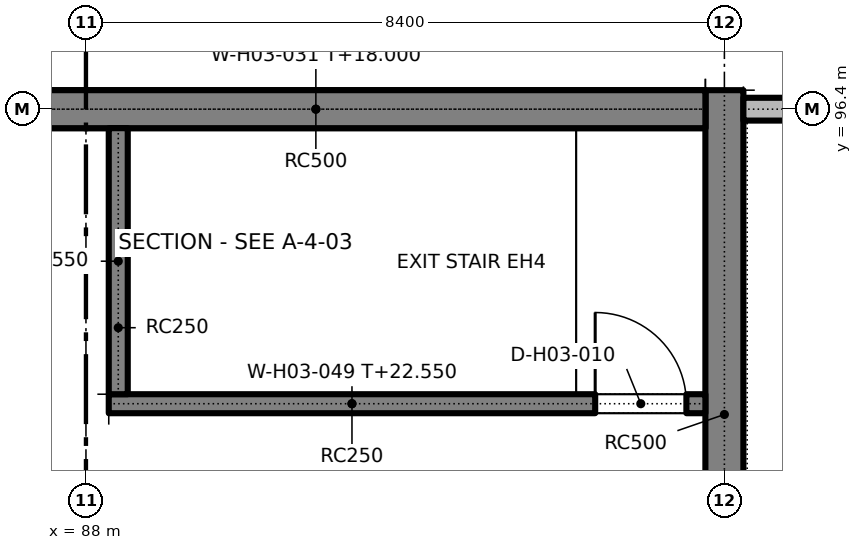
"""IFC4 building model, lengths in metres.
Left out: names, types, materials, properties, quantities, classifications, styles, units other than length and angle.
Written with IfcOpenShell. Run it as: python <this file> out.ifc"""

import sys

from ifc_helpers import new_model, si_unit, direction, frame, frame_2d, origin, place, context, subcontext, project, spatial, rectangle, extrude, element, fill, save


model = new_model("IFC4")
c1 = context("Model", 3, precision=1e-05, world=origin(), true_north=direction((0.0, 1.0)))
c2 = subcontext(c1, "Body", "Model", "MODEL_VIEW")
j1 = project(units=[si_unit("LENGTHUNIT", "METRE"), si_unit("PLANEANGLEUNIT", "RADIAN")], contexts=[c1])
p1 = place(None, origin())
s1 = spatial("IfcSite", under=j1, at=p1, CompositionType="ELEMENT")
p2 = place(p1, origin())
s2 = spatial("IfcBuilding", under=s1, at=p2, CompositionType="ELEMENT")
p3 = place(p2, frame((0.0, 0.0, 15.0)))
s3 = spatial("IfcBuildingStorey", under=s2, at=p3, CompositionType="ELEMENT", Elevation=15.0)
p4 = place(p3, frame((96.4, 54.15, 0.0), z_axis=(0.0, 0.0, 1.0), x_axis=(0.0, 1.0, 0.0)))
e1 = element("IfcWall", 1, at=p4, inside=s3, PredefinedType="SOLIDWALL", context=c2, shape_type="SweptSolid", body=[
    extrude(rectangle(XDim=42.5, YDim=0.5, at=frame_2d((21.25, 0.0))), origin(), (0.0, 0.0, 1.0), 4.2),
])
p5 = place(p3, frame((85.9, 96.4, 0.0), z_axis=(0.0, 0.0, 1.0), x_axis=(1.0, 0.0, 0.0)))
e2 = element("IfcWall", 2, at=p5, inside=s3, PredefinedType="SOLIDWALL", context=c2, shape_type="SweptSolid", body=[
    extrude(rectangle(XDim=10.25, YDim=0.5, at=frame_2d((5.125, 0.0))), origin(), (0.0, 0.0, 1.0), 3.0),
])
p6 = place(p3, frame((29.45, 96.4, 3.0), z_axis=(0.0, 0.0, 1.0), x_axis=(1.0, 0.0, 0.0)))
e3 = element("IfcWall", 3, at=p6, inside=s3, PredefinedType="SOLIDWALL", context=c2, shape_type="SweptSolid", body=[
    extrude(rectangle(XDim=66.7, YDim=0.5, at=frame_2d((33.35, 0.0))), origin(), (0.0, 0.0, 1.0), 1.2),
])
p7 = place(p3, frame((88.3, 92.525, 0.0), z_axis=(0.0, 0.0, 1.0), x_axis=(1.0, 0.0, 0.0)))
e4 = element("IfcWall", 4, at=p7, inside=s3, PredefinedType="SOLIDWALL", context=c2, shape_type="SweptSolid", body=[
    extrude(rectangle(XDim=7.85, YDim=0.25, at=frame_2d((3.925, 0.0))), origin(), (0.0, 0.0, 1.0), 7.55),
])
p8 = place(p7, frame((6.4, 0.0, 0.0)))
e5 = element("IfcOpeningElement", 5, at=p8, cuts=e4, PredefinedType="OPENING", context=c2, shape_type="SweptSolid", body=[
    extrude(rectangle(XDim=1.2, YDim=2.1, at=frame_2d((0.6, 1.05))), frame((0.0, 0.135, 0.0), z_axis=(0.0, -1.0, 0.0), x_axis=(1.0, 0.0, 0.0)), (0.0, 0.0, 1.0), 0.27),
])
p9 = place(p3, frame((88.425, 92.65, 0.0), z_axis=(0.0, 0.0, 1.0), x_axis=(0.0, 1.0, 0.0)))
e6 = element("IfcWall", 6, at=p9, inside=s3, PredefinedType="SOLIDWALL", context=c2, shape_type="SweptSolid", body=[
    extrude(rectangle(XDim=3.5, YDim=0.25, at=frame_2d((1.75, 0.0))), origin(), (0.0, 0.0, 1.0), 7.55),
])
p10 = place(p3, frame((96.65, 96.4, 0.0), z_axis=(0.0, 0.0, 1.0), x_axis=(1.0, 0.0, 0.0)))
e7 = element("IfcWall", 7, at=p10, inside=s3, PredefinedType="PARAPET", context=c2, shape_type="SweptSolid", body=[
    extrude(rectangle(XDim=24.95, YDim=0.3, at=frame_2d((12.475, 0.0))), origin(), (0.0, 0.0, 1.0), 1.1),
])
p11 = place(p8, origin())
e8 = element("IfcDoor", 8, at=p11, inside=s3, OperationType="SINGLE_SWING_LEFT", PredefinedType="DOOR", context=c2, shape_type="SweptSolid", body=[
    extrude(rectangle(XDim=1.2, YDim=2.1, at=frame_2d((0.6, 1.05))), frame((0.0, 0.025, 0.0), z_axis=(0.0, -1.0, 0.0), x_axis=(1.0, 0.0, 0.0)), (0.0, 0.0, 1.0), 0.05),
])
fill(e5, e8)
save(model, sys.argv[1])
